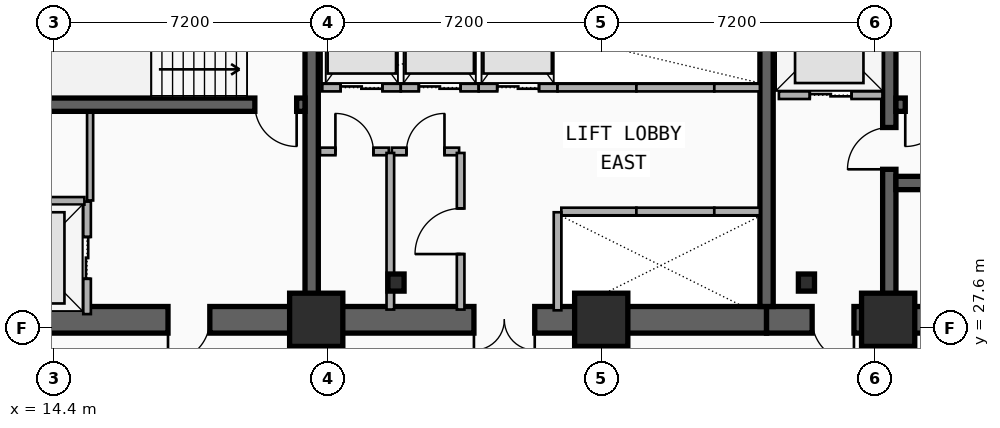
"""IFC4 building model, lengths in metres.
Left out: names, types, materials, properties, quantities, classifications, styles, units other than length and angle.
Written with IfcOpenShell. Run it as: python <this file> out.ifc"""

import sys

from ifc_helpers import new_model, si_unit, direction, frame, frame_2d, origin, origin_2d, place, context, subcontext, project, spatial, rectangle, i_section, extrude, element, fill, save


model = new_model("IFC4")
c1 = context("Model", 3, precision=1e-05, world=origin(), true_north=direction((0.0, 1.0)))
c2 = subcontext(c1, "Body", "Model", "MODEL_VIEW")
j1 = project(units=[si_unit("LENGTHUNIT", "METRE"), si_unit("PLANEANGLEUNIT", "RADIAN")], contexts=[c1])
p1 = place(None, origin())
s1 = spatial("IfcSite", under=j1, at=p1, CompositionType="ELEMENT")
p2 = place(p1, origin())
s2 = spatial("IfcBuilding", under=s1, at=p2, CompositionType="ELEMENT")
p3 = place(p2, frame((0.0, 0.0, 64.0)))
s3 = spatial("IfcBuildingStorey", under=s2, at=p3, CompositionType="ELEMENT", Elevation=64.0)
p4 = place(p3, frame((21.18, 27.82, 0.0), z_axis=(0.0, 0.0, 1.0), x_axis=(-1.0, 0.0, 0.0)))
e1 = element("IfcWall", 1, at=p4, inside=s3, PredefinedType="SHEAR", context=c2, shape_type="SweptSolid", body=[
    extrude(rectangle(XDim=9.03, YDim=0.7, at=frame_2d((4.515, 0.0))), origin(), (0.0, 0.0, 1.0), 3.5),
])
p5 = place(p4, frame((2.68, 0.0, 0.0)))
e2 = element("IfcOpeningElement", 2, at=p5, cuts=e1, PredefinedType="OPENING", context=c2, shape_type="SweptSolid", body=[
    extrude(rectangle(XDim=1.1, YDim=2.15, at=frame_2d((0.55, 1.075))), frame((0.0, 0.36, 0.0), z_axis=(0.0, -1.0, 0.0), x_axis=(1.0, 0.0, 0.0)), (0.0, 0.0, 1.0), 0.72),
])
p6 = place(p3, frame((33.15, 27.82, 0.0), z_axis=(0.0, 0.0, 1.0), x_axis=(-1.0, 0.0, 0.0)))
e3 = element("IfcWall", 3, at=p6, inside=s3, PredefinedType="SHEAR", context=c2, shape_type="SweptSolid", body=[
    extrude(rectangle(XDim=11.97, YDim=0.7, at=frame_2d((5.985, 0.0))), origin(), (0.0, 0.0, 1.0), 3.5),
])
p7 = place(p6, frame((6.1, 0.0, 0.0)))
e4 = element("IfcOpeningElement", 4, at=p7, cuts=e3, PredefinedType="OPENING", context=c2, shape_type="SweptSolid", body=[
    extrude(rectangle(XDim=1.6, YDim=2.2, at=frame_2d((0.8, 1.1))), frame((0.0, 0.36, 0.0), z_axis=(0.0, -1.0, 0.0), x_axis=(1.0, 0.0, 0.0)), (0.0, 0.0, 1.0), 0.72),
])
p8 = place(p3, frame((45.38, 27.82, 0.0), z_axis=(0.0, 0.0, 1.0), x_axis=(-1.0, 0.0, 0.0)))
e5 = element("IfcWall", 5, at=p8, inside=s3, PredefinedType="SHEAR", context=c2, shape_type="SweptSolid", body=[
    extrude(rectangle(XDim=12.23, YDim=0.7, at=frame_2d((6.115, 0.0))), origin(), (0.0, 0.0, 1.0), 3.5),
])
p9 = place(p8, frame((9.93, 0.0, 0.0)))
e6 = element("IfcOpeningElement", 6, at=p9, cuts=e5, PredefinedType="OPENING", context=c2, shape_type="SweptSolid", body=[
    extrude(rectangle(XDim=1.1, YDim=2.15, at=frame_2d((0.55, 1.075))), frame((0.0, 0.36, 0.0), z_axis=(0.0, -1.0, 0.0), x_axis=(1.0, 0.0, 0.0)), (0.0, 0.0, 1.0), 0.72),
])
p10 = place(p8, frame((6.23, 0.0, 0.0)))
e7 = element("IfcOpeningElement", 7, at=p10, cuts=e5, PredefinedType="OPENING", context=c2, shape_type="SweptSolid", body=[
    extrude(rectangle(XDim=1.1, YDim=2.15, at=frame_2d((0.55, 1.075))), frame((0.0, 0.36, 0.0), z_axis=(0.0, -1.0, 0.0), x_axis=(1.0, 0.0, 0.0)), (0.0, 0.0, 1.0), 0.72),
])
for number, where, z_axis, x_axis in (
    (8, (21.18, 28.17, 0.0), (0.0, 0.0, 1.0), (0.0, 1.0, 0.0)),
    (9, (33.15, 28.17, 0.0), (0.0, 0.0, 1.0), (0.0, 1.0, 0.0)),
):
    element("IfcWall", number, at=place(p3, frame(where, z_axis=z_axis, x_axis=x_axis)), inside=s3, PredefinedType="SHEAR", context=c2, shape_type="SweptSolid", body=[
        extrude(rectangle(XDim=8.53, YDim=0.35, at=frame_2d((4.265, 0.0))), origin(), (0.0, 0.0, 1.0), 3.5),
    ])
p11 = place(p3, frame((36.38, 28.17, 0.0), z_axis=(0.0, 0.0, 1.0), x_axis=(0.0, 1.0, 0.0)))
e10 = element("IfcWall", 10, at=p11, inside=s3, PredefinedType="SHEAR", context=c2, shape_type="SweptSolid", body=[
    extrude(rectangle(XDim=8.53, YDim=0.35, at=frame_2d((4.265, 0.0))), origin(), (0.0, 0.0, 1.0), 3.5),
])
p12 = place(p11, frame((3.61, 0.0, 0.0)))
e11 = element("IfcOpeningElement", 11, at=p12, cuts=e10, PredefinedType="OPENING", context=c2, shape_type="SweptSolid", body=[
    extrude(rectangle(XDim=1.1, YDim=2.15, at=frame_2d((0.55, 1.075))), frame((0.0, 0.185, 0.0), z_axis=(0.0, -1.0, 0.0), x_axis=(1.0, 0.0, 0.0)), (0.0, 0.0, 1.0), 0.37),
])
p13 = place(p3, frame((21.005, 33.48, 0.0), z_axis=(0.0, 0.0, 1.0), x_axis=(-1.0, 0.0, 0.0)))
e12 = element("IfcWall", 12, at=p13, inside=s3, PredefinedType="SHEAR", context=c2, shape_type="SweptSolid", body=[
    extrude(rectangle(XDim=8.505, YDim=0.35, at=frame_2d((4.252, 0.0))), origin(), (0.0, 0.0, 1.0), 3.5),
])
p14 = place(p13, frame((0.22, 0.0, 0.0)))
e13 = element("IfcOpeningElement", 13, at=p14, cuts=e12, PredefinedType="OPENING", context=c2, shape_type="SweptSolid", body=[
    extrude(rectangle(XDim=1.1, YDim=2.15, at=frame_2d((0.55, 1.075))), frame((0.0, 0.185, 0.0), z_axis=(0.0, -1.0, 0.0), x_axis=(1.0, 0.0, 0.0)), (0.0, 0.0, 1.0), 0.37),
])
p15 = place(p3, frame((45.03, 33.48, 0.0), z_axis=(0.0, 0.0, 1.0), x_axis=(-1.0, 0.0, 0.0)))
e14 = element("IfcWall", 14, at=p15, inside=s3, PredefinedType="SHEAR", context=c2, shape_type="SweptSolid", body=[
    extrude(rectangle(XDim=8.475, YDim=0.35, at=frame_2d((4.238, 0.0))), origin(), (0.0, 0.0, 1.0), 3.5),
])
p16 = place(p15, frame((7.13, 0.0, 0.0)))
e15 = element("IfcOpeningElement", 15, at=p16, cuts=e14, PredefinedType="OPENING", context=c2, shape_type="SweptSolid", body=[
    extrude(rectangle(XDim=1.1, YDim=2.15, at=frame_2d((0.55, 1.075))), frame((0.0, 0.185, 0.0), z_axis=(0.0, -1.0, 0.0), x_axis=(1.0, 0.0, 0.0)), (0.0, 0.0, 1.0), 0.37),
])
p17 = place(p3, frame((36.555, 31.42, 0.0), z_axis=(0.0, 0.0, 1.0), x_axis=(1.0, 0.0, 0.0)))
e16 = element("IfcWall", 16, at=p17, inside=s3, PredefinedType="SHEAR", context=c2, shape_type="SweptSolid", body=[
    extrude(rectangle(XDim=8.475, YDim=0.35, at=frame_2d((4.238, 0.0))), origin(), (0.0, 0.0, 1.0), 3.5),
])
for number, where, z_axis, x_axis in (
    (17, (23.4, 28.8, 0.0), (0.0, 0.0, 1.0), (1.0, 0.0, 0.0)),
    (18, (34.2, 28.8, 0.0), (0.0, 0.0, 1.0), (1.0, 0.0, 0.0)),
):
    element("IfcColumn", number, at=place(p3, frame(where, z_axis=z_axis, x_axis=x_axis)), inside=s3, PredefinedType="COLUMN", context=c2, shape_type="SweptSolid", body=[
        extrude(i_section(OverallWidth=0.424, OverallDepth=0.45, WebThickness=0.041, FlangeThickness=0.065, FilletRadius=0.015, at=origin_2d()), origin(), (0.0, 0.0, 1.0), 3.5),
    ])
for number, where, z_axis, x_axis in (
    (19, (21.3, 27.82, 0.0), (0.0, 0.0, 1.0), (1.0, 0.0, 0.0)),
    (20, (28.8, 27.82, 0.0), (0.0, 0.0, 1.0), (1.0, 0.0, 0.0)),
    (21, (36.35, 27.82, 0.0), (0.0, 0.0, 1.0), (1.0, 0.0, 0.0)),
):
    element("IfcColumn", number, at=place(p3, frame(where, z_axis=z_axis, x_axis=x_axis)), inside=s3, PredefinedType="COLUMN", context=c2, shape_type="SweptSolid", body=[
        extrude(rectangle(XDim=1.4, YDim=1.4, at=origin_2d()), origin(), (0.0, 0.0, 1.0), 3.5),
    ])
p18 = place(p3, frame((15.27, 27.97, 0.0), z_axis=(0.0, 0.0, 1.0), x_axis=(0.0, 1.0, 0.0)))
e22 = element("IfcWall", 22, at=p18, inside=s3, PredefinedType="PARTITIONING", context=c2, shape_type="SweptSolid", body=[
    extrude(rectangle(XDim=2.96, YDim=0.2, at=frame_2d((1.48, 0.0))), origin(), (0.0, 0.0, 1.0), 2.212),
])
p19 = place(p18, frame((0.93, 0.0, 0.0)))
e23 = element("IfcOpeningElement", 23, at=p19, cuts=e22, PredefinedType="OPENING", context=c2, shape_type="SweptSolid", body=[
    extrude(rectangle(XDim=1.1, YDim=2.15, at=frame_2d((0.55, 1.075))), frame((0.0, 0.11, 0.0), z_axis=(0.0, -1.0, 0.0), x_axis=(1.0, 0.0, 0.0)), (0.0, 0.0, 1.0), 0.22),
])
p20 = place(p3, frame((12.45, 30.95, 0.0), z_axis=(0.0, 0.0, 1.0), x_axis=(1.0, 0.0, 0.0)))
e24 = element("IfcWall", 24, at=p20, inside=s3, PredefinedType="PARTITIONING", context=c2, shape_type="SweptSolid", body=[
    extrude(rectangle(XDim=2.75, YDim=0.2, at=frame_2d((1.375, 0.0))), origin(), (0.0, 0.0, 1.0), 2.212),
])
p21 = place(p3, frame((33.475, 33.73, 0.0), z_axis=(0.0, 0.0, 1.0), x_axis=(1.0, 0.0, 0.0)))
e25 = element("IfcWall", 25, at=p21, inside=s3, PredefinedType="PARTITIONING", context=c2, shape_type="SweptSolid", body=[
    extrude(rectangle(XDim=2.725, YDim=0.2, at=frame_2d((1.362, 0.0))), origin(), (0.0, 0.0, 1.0), 2.212),
])
p22 = place(p21, frame((0.812, 0.0, 0.0)))
e26 = element("IfcOpeningElement", 26, at=p22, cuts=e25, PredefinedType="OPENING", context=c2, shape_type="SweptSolid", body=[
    extrude(rectangle(XDim=1.1, YDim=2.15, at=frame_2d((0.55, 1.075))), frame((0.0, 0.11, 0.0), z_axis=(0.0, -1.0, 0.0), x_axis=(1.0, 0.0, 0.0)), (0.0, 0.0, 1.0), 0.22),
])
p23 = place(p3, frame((27.75, 30.67, 0.0), z_axis=(0.0, 0.0, 1.0), x_axis=(1.0, 0.0, 0.0)))
e27 = element("IfcWall", 27, at=p23, inside=s3, PredefinedType="PARTITIONING", context=c2, shape_type="SweptSolid", body=[
    extrude(rectangle(XDim=1.975, YDim=0.2, at=frame_2d((0.988, 0.0))), origin(), (0.0, 0.0, 1.0), 2.212),
])
p24 = place(p3, frame((27.65, 28.07, 0.0), z_axis=(0.0, 0.0, 1.0), x_axis=(0.0, 1.0, 0.0)))
e28 = element("IfcWall", 28, at=p24, inside=s3, PredefinedType="PARTITIONING", context=c2, shape_type="SweptSolid", body=[
    extrude(rectangle(XDim=2.58, YDim=0.2, at=frame_2d((1.29, 0.0))), origin(), (0.0, 0.0, 1.0), 2.212),
])
p25 = place(p3, frame((29.725, 30.67, 0.0), z_axis=(0.0, 0.0, 1.0), x_axis=(1.0, 0.0, 0.0)))
e29 = element("IfcWall", 29, at=p25, inside=s3, PredefinedType="PARTITIONING", context=c2, shape_type="SweptSolid", body=[
    extrude(rectangle(XDim=2.05, YDim=0.2, at=frame_2d((1.025, 0.0))), origin(), (0.0, 0.0, 1.0), 2.62),
])
p26 = place(p3, frame((31.775, 30.67, 0.0), z_axis=(0.0, 0.0, 1.0), x_axis=(1.0, 0.0, 0.0)))
e30 = element("IfcWall", 30, at=p26, inside=s3, PredefinedType="PARTITIONING", context=c2, shape_type="SweptSolid", body=[
    extrude(rectangle(XDim=1.2, YDim=0.2, at=frame_2d((0.6, 0.0))), origin(), (0.0, 0.0, 1.0), 2.62),
])
p27 = place(p3, frame((21.46, 33.93, 0.0), z_axis=(0.0, 0.0, 1.0), x_axis=(1.0, 0.0, 0.0)))
e31 = element("IfcWall", 31, at=p27, inside=s3, PredefinedType="PARTITIONING", context=c2, shape_type="SweptSolid", body=[
    extrude(rectangle(XDim=2.065, YDim=0.2, at=frame_2d((1.032, 0.0))), origin(), (0.0, 0.0, 1.0), 2.212),
])
p28 = place(p27, frame((0.482, 0.0, 0.0)))
e32 = element("IfcOpeningElement", 32, at=p28, cuts=e31, PredefinedType="OPENING", context=c2, shape_type="SweptSolid", body=[
    extrude(rectangle(XDim=1.1, YDim=2.15, at=frame_2d((0.55, 1.075))), frame((0.0, 0.11, 0.0), z_axis=(0.0, -1.0, 0.0), x_axis=(1.0, 0.0, 0.0)), (0.0, 0.0, 1.0), 0.22),
])
p29 = place(p3, frame((23.525, 33.93, 0.0), z_axis=(0.0, 0.0, 1.0), x_axis=(1.0, 0.0, 0.0)))
e33 = element("IfcWall", 33, at=p29, inside=s3, PredefinedType="PARTITIONING", context=c2, shape_type="SweptSolid", body=[
    extrude(rectangle(XDim=2.05, YDim=0.2, at=frame_2d((1.025, 0.0))), origin(), (0.0, 0.0, 1.0), 3.24),
])
p30 = place(p29, frame((0.475, 0.0, 0.0)))
e34 = element("IfcOpeningElement", 34, at=p30, cuts=e33, PredefinedType="OPENING", context=c2, shape_type="SweptSolid", body=[
    extrude(rectangle(XDim=1.1, YDim=2.15, at=frame_2d((0.55, 1.075))), frame((0.0, 0.11, 0.0), z_axis=(0.0, -1.0, 0.0), x_axis=(1.0, 0.0, 0.0)), (0.0, 0.0, 1.0), 0.22),
])
p31 = place(p3, frame((25.575, 33.93, 0.0), z_axis=(0.0, 0.0, 1.0), x_axis=(1.0, 0.0, 0.0)))
e35 = element("IfcWall", 35, at=p31, inside=s3, PredefinedType="PARTITIONING", context=c2, shape_type="SweptSolid", body=[
    extrude(rectangle(XDim=2.075, YDim=0.2, at=frame_2d((1.038, 0.0))), origin(), (0.0, 0.0, 1.0), 3.24),
])
p32 = place(p31, frame((0.488, 0.0, 0.0)))
e36 = element("IfcOpeningElement", 36, at=p32, cuts=e35, PredefinedType="OPENING", context=c2, shape_type="SweptSolid", body=[
    extrude(rectangle(XDim=1.1, YDim=2.15, at=frame_2d((0.55, 1.075))), frame((0.0, 0.11, 0.0), z_axis=(0.0, -1.0, 0.0), x_axis=(1.0, 0.0, 0.0)), (0.0, 0.0, 1.0), 0.22),
])
p33 = place(p3, frame((27.65, 33.93, 0.0), z_axis=(0.0, 0.0, 1.0), x_axis=(1.0, 0.0, 0.0)))
e37 = element("IfcWall", 37, at=p33, inside=s3, PredefinedType="PARTITIONING", context=c2, shape_type="SweptSolid", body=[
    extrude(rectangle(XDim=2.075, YDim=0.2, at=frame_2d((1.038, 0.0))), origin(), (0.0, 0.0, 1.0), 2.212),
])
p34 = place(p3, frame((29.725, 33.93, 0.0), z_axis=(0.0, 0.0, 1.0), x_axis=(1.0, 0.0, 0.0)))
e38 = element("IfcWall", 38, at=p34, inside=s3, PredefinedType="PARTITIONING", context=c2, shape_type="SweptSolid", body=[
    extrude(rectangle(XDim=2.05, YDim=0.2, at=frame_2d((1.025, 0.0))), origin(), (0.0, 0.0, 1.0), 3.24),
])
p35 = place(p3, frame((31.775, 33.93, 0.0), z_axis=(0.0, 0.0, 1.0), x_axis=(1.0, 0.0, 0.0)))
e39 = element("IfcWall", 39, at=p35, inside=s3, PredefinedType="PARTITIONING", context=c2, shape_type="SweptSolid", body=[
    extrude(rectangle(XDim=1.2, YDim=0.2, at=frame_2d((0.6, 0.0))), origin(), (0.0, 0.0, 1.0), 3.24),
])
p36 = place(p3, frame((21.4, 32.25, 0.0), z_axis=(0.0, 0.0, 1.0), x_axis=(1.0, 0.0, 0.0)))
e40 = element("IfcWall", 40, at=p36, inside=s3, PredefinedType="PARTITIONING", context=c2, shape_type="SweptSolid", body=[
    extrude(rectangle(XDim=1.81, YDim=0.2, at=frame_2d((0.905, 0.0))), origin(), (0.0, 0.0, 1.0), 2.28),
])
p37 = place(p36, frame((0.405, 0.0, 0.0)))
e41 = element("IfcOpeningElement", 41, at=p37, cuts=e40, PredefinedType="OPENING", context=c2, shape_type="SweptSolid", body=[
    extrude(rectangle(XDim=1.0, YDim=2.15, at=frame_2d((0.5, 1.075))), frame((0.0, 0.11, 0.0), z_axis=(0.0, -1.0, 0.0), x_axis=(1.0, 0.0, 0.0)), (0.0, 0.0, 1.0), 0.22),
])
p38 = place(p3, frame((23.29, 32.25, 0.0), z_axis=(0.0, 0.0, 1.0), x_axis=(1.0, 0.0, 0.0)))
e42 = element("IfcWall", 42, at=p38, inside=s3, PredefinedType="PARTITIONING", context=c2, shape_type="SweptSolid", body=[
    extrude(rectangle(XDim=1.77, YDim=0.2, at=frame_2d((0.885, 0.0))), origin(), (0.0, 0.0, 1.0), 3.24),
])
p39 = place(p38, frame((0.385, 0.0, 0.0)))
e43 = element("IfcOpeningElement", 43, at=p39, cuts=e42, PredefinedType="OPENING", context=c2, shape_type="SweptSolid", body=[
    extrude(rectangle(XDim=1.0, YDim=2.15, at=frame_2d((0.5, 1.075))), frame((0.0, 0.11, 0.0), z_axis=(0.0, -1.0, 0.0), x_axis=(1.0, 0.0, 0.0)), (0.0, 0.0, 1.0), 0.22),
])
p40 = place(p3, frame((25.1, 28.09, 0.0), z_axis=(0.0, 0.0, 1.0), x_axis=(0.0, 1.0, 0.0)))
e44 = element("IfcWall", 44, at=p40, inside=s3, PredefinedType="PARTITIONING", context=c2, shape_type="SweptSolid", body=[
    extrude(rectangle(XDim=4.12, YDim=0.2, at=frame_2d((2.06, 0.0))), origin(), (0.0, 0.0, 1.0), 2.62),
])
p41 = place(p40, frame((1.46, 0.0, 0.0)))
e45 = element("IfcOpeningElement", 45, at=p41, cuts=e44, PredefinedType="OPENING", context=c2, shape_type="SweptSolid", body=[
    extrude(rectangle(XDim=1.2, YDim=2.15, at=frame_2d((0.6, 1.075))), frame((0.0, 0.11, 0.0), z_axis=(0.0, -1.0, 0.0), x_axis=(1.0, 0.0, 0.0)), (0.0, 0.0, 1.0), 0.22),
])
p42 = place(p3, frame((23.25, 28.09, 0.0), z_axis=(0.0, 0.0, 1.0), x_axis=(0.0, 1.0, 0.0)))
e46 = element("IfcWall", 46, at=p42, inside=s3, PredefinedType="PARTITIONING", context=c2, shape_type="SweptSolid", body=[
    extrude(rectangle(XDim=4.12, YDim=0.2, at=frame_2d((2.06, 0.0))), origin(), (0.0, 0.0, 1.0), 2.62),
])
p43 = place(p3, frame((15.35, 30.96, 0.0), z_axis=(0.0, 0.0, 1.0), x_axis=(0.0, 1.0, 0.0)))
e47 = element("IfcWall", 47, at=p43, inside=s3, PredefinedType="PARTITIONING", context=c2, shape_type="SweptSolid", body=[
    extrude(rectangle(XDim=2.31, YDim=0.16, at=frame_2d((1.155, 0.0))), origin(), (0.0, 0.0, 1.0), 3.24),
])
p44 = place(p19, origin())
e48 = element("IfcDoor", 48, at=p44, inside=s3, OperationType="DOUBLE_DOOR_SLIDING", PredefinedType="DOOR", context=c2, shape_type="SweptSolid", body=[
    extrude(rectangle(XDim=1.1, YDim=2.15, at=frame_2d((0.55, 1.075))), frame((0.0, 0.025, 0.0), z_axis=(0.0, -1.0, 0.0), x_axis=(1.0, 0.0, 0.0)), (0.0, 0.0, 1.0), 0.05),
])
fill(e23, e48)
p45 = place(p22, origin())
e49 = element("IfcDoor", 49, at=p45, inside=s3, OperationType="DOUBLE_DOOR_SLIDING", PredefinedType="DOOR", context=c2, shape_type="SweptSolid", body=[
    extrude(rectangle(XDim=1.1, YDim=2.15, at=frame_2d((0.55, 1.075))), frame((0.0, 0.025, 0.0), z_axis=(0.0, -1.0, 0.0), x_axis=(1.0, 0.0, 0.0)), (0.0, 0.0, 1.0), 0.05),
])
fill(e26, e49)
p46 = place(p28, origin())
e50 = element("IfcDoor", 50, at=p46, inside=s3, OperationType="DOUBLE_DOOR_SLIDING", PredefinedType="DOOR", context=c2, shape_type="SweptSolid", body=[
    extrude(rectangle(XDim=1.1, YDim=2.15, at=frame_2d((0.55, 1.075))), frame((0.0, 0.025, 0.0), z_axis=(0.0, -1.0, 0.0), x_axis=(1.0, 0.0, 0.0)), (0.0, 0.0, 1.0), 0.05),
])
fill(e32, e50)
p47 = place(p30, origin())
e51 = element("IfcDoor", 51, at=p47, inside=s3, OperationType="DOUBLE_DOOR_SLIDING", PredefinedType="DOOR", context=c2, shape_type="SweptSolid", body=[
    extrude(rectangle(XDim=1.1, YDim=2.15, at=frame_2d((0.55, 1.075))), frame((0.0, 0.025, 0.0), z_axis=(0.0, -1.0, 0.0), x_axis=(1.0, 0.0, 0.0)), (0.0, 0.0, 1.0), 0.05),
])
fill(e34, e51)
p48 = place(p32, origin())
e52 = element("IfcDoor", 52, at=p48, inside=s3, OperationType="DOUBLE_DOOR_SLIDING", PredefinedType="DOOR", context=c2, shape_type="SweptSolid", body=[
    extrude(rectangle(XDim=1.1, YDim=2.15, at=frame_2d((0.55, 1.075))), frame((0.0, 0.025, 0.0), z_axis=(0.0, -1.0, 0.0), x_axis=(1.0, 0.0, 0.0)), (0.0, 0.0, 1.0), 0.05),
])
fill(e36, e52)
p49 = place(p14, origin())
e53 = element("IfcDoor", 53, at=p49, inside=s3, OperationType="SINGLE_SWING_LEFT", PredefinedType="DOOR", context=c2, shape_type="SweptSolid", body=[
    extrude(rectangle(XDim=1.1, YDim=2.15, at=frame_2d((0.55, 1.075))), frame((0.0, 0.025, 0.0), z_axis=(0.0, -1.0, 0.0), x_axis=(1.0, 0.0, 0.0)), (0.0, 0.0, 1.0), 0.05),
])
fill(e13, e53)
p50 = place(p5, origin())
e54 = element("IfcDoor", 54, at=p50, inside=s3, OperationType="SINGLE_SWING_RIGHT", PredefinedType="DOOR", context=c2, shape_type="SweptSolid", body=[
    extrude(rectangle(XDim=1.1, YDim=2.15, at=frame_2d((0.55, 1.075))), frame((0.0, 0.025, 0.0), z_axis=(0.0, -1.0, 0.0), x_axis=(1.0, 0.0, 0.0)), (0.0, 0.0, 1.0), 0.05),
])
fill(e2, e54)
p51 = place(p16, origin())
e55 = element("IfcDoor", 55, at=p51, inside=s3, OperationType="SINGLE_SWING_RIGHT", PredefinedType="DOOR", context=c2, shape_type="SweptSolid", body=[
    extrude(rectangle(XDim=1.1, YDim=2.15, at=frame_2d((0.55, 1.075))), frame((0.0, 0.025, 0.0), z_axis=(0.0, -1.0, 0.0), x_axis=(1.0, 0.0, 0.0)), (0.0, 0.0, 1.0), 0.05),
])
fill(e15, e55)
p52 = place(p12, origin())
e56 = element("IfcDoor", 56, at=p52, inside=s3, OperationType="SINGLE_SWING_LEFT", PredefinedType="DOOR", context=c2, shape_type="SweptSolid", body=[
    extrude(rectangle(XDim=1.1, YDim=2.15, at=frame_2d((0.55, 1.075))), frame((0.0, 0.025, 0.0), z_axis=(0.0, -1.0, 0.0), x_axis=(1.0, 0.0, 0.0)), (0.0, 0.0, 1.0), 0.05),
])
fill(e11, e56)
p53 = place(p9, origin())
e57 = element("IfcDoor", 57, at=p53, inside=s3, OperationType="SINGLE_SWING_LEFT", PredefinedType="DOOR", context=c2, shape_type="SweptSolid", body=[
    extrude(rectangle(XDim=1.1, YDim=2.15, at=frame_2d((0.55, 1.075))), frame((0.0, 0.025, 0.0), z_axis=(0.0, -1.0, 0.0), x_axis=(1.0, 0.0, 0.0)), (0.0, 0.0, 1.0), 0.05),
])
fill(e6, e57)
p54 = place(p7, origin())
e58 = element("IfcDoor", 58, at=p54, inside=s3, OperationType="SINGLE_SWING_LEFT", PredefinedType="DOOR", context=c2, shape_type="SweptSolid", body=[
    extrude(rectangle(XDim=1.6, YDim=2.2, at=frame_2d((0.8, 1.1))), frame((0.0, 0.025, 0.0), z_axis=(0.0, -1.0, 0.0), x_axis=(1.0, 0.0, 0.0)), (0.0, 0.0, 1.0), 0.05),
])
fill(e4, e58)
p55 = place(p37, origin())
e59 = element("IfcDoor", 59, at=p55, inside=s3, OperationType="SINGLE_SWING_LEFT", PredefinedType="DOOR", context=c2, shape_type="SweptSolid", body=[
    extrude(rectangle(XDim=1.0, YDim=2.15, at=frame_2d((0.5, 1.075))), frame((0.0, 0.025, 0.0), z_axis=(0.0, -1.0, 0.0), x_axis=(1.0, 0.0, 0.0)), (0.0, 0.0, 1.0), 0.05),
])
fill(e41, e59)
p56 = place(p39, origin())
e60 = element("IfcDoor", 60, at=p56, inside=s3, OperationType="SINGLE_SWING_RIGHT", PredefinedType="DOOR", context=c2, shape_type="SweptSolid", body=[
    extrude(rectangle(XDim=1.0, YDim=2.15, at=frame_2d((0.5, 1.075))), frame((0.0, 0.025, 0.0), z_axis=(0.0, -1.0, 0.0), x_axis=(1.0, 0.0, 0.0)), (0.0, 0.0, 1.0), 0.05),
])
fill(e43, e60)
p57 = place(p41, origin())
e61 = element("IfcDoor", 61, at=p57, inside=s3, OperationType="SINGLE_SWING_LEFT", PredefinedType="DOOR", context=c2, shape_type="SweptSolid", body=[
    extrude(rectangle(XDim=1.2, YDim=2.15, at=frame_2d((0.6, 1.075))), frame((0.0, 0.025, 0.0), z_axis=(0.0, -1.0, 0.0), x_axis=(1.0, 0.0, 0.0)), (0.0, 0.0, 1.0), 0.05),
])
fill(e45, e61)
save(model, sys.argv[1])
